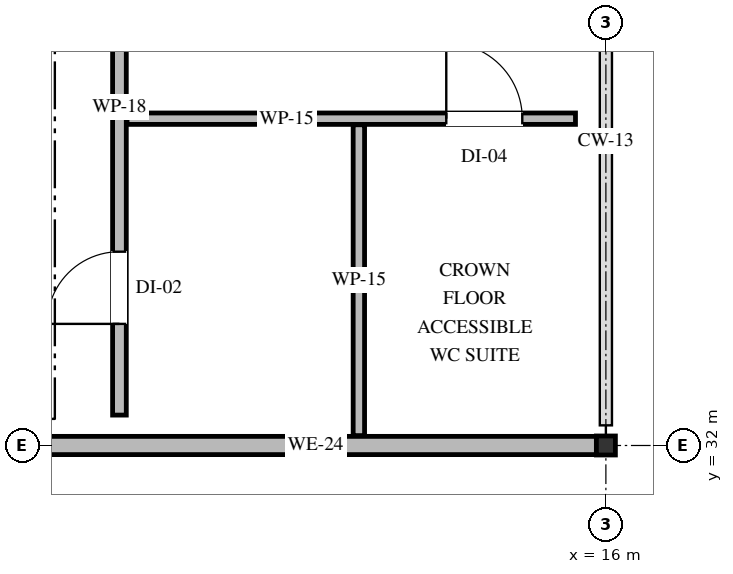
"""IFC4 building model, lengths in metres.
Left out: names, types, materials, properties, quantities, classifications, styles, units other than length and angle.
Written with IfcOpenShell. Run it as: python <this file> out.ifc"""

import sys

from ifc_helpers import new_model, si_unit, direction, frame, frame_2d, origin, origin_2d, place, context, subcontext, project, spatial, rectangle, hollow_rectangle, extrude, element, fill, save


model = new_model("IFC4")
c1 = context("Model", 3, precision=1e-05, world=origin(), true_north=direction((0.0, 1.0)))
c2 = subcontext(c1, "Body", "Model", "MODEL_VIEW")
j1 = project(units=[si_unit("LENGTHUNIT", "METRE"), si_unit("PLANEANGLEUNIT", "RADIAN")], contexts=[c1])
p1 = place(None, origin())
s1 = spatial("IfcSite", under=j1, at=p1, CompositionType="ELEMENT")
p2 = place(p1, origin())
s2 = spatial("IfcBuilding", under=s1, at=p2, CompositionType="ELEMENT")
p3 = place(p2, frame((0.0, 0.0, 19.8)))
s3 = spatial("IfcBuildingStorey", under=s2, at=p3, CompositionType="ELEMENT", Elevation=19.8)
p4 = place(p3, frame((16.0, 32.0, 0.0), z_axis=(0.0, 0.0, 1.0), x_axis=(1.0, 0.0, 0.0)))
e1 = element("IfcColumn", 1, at=p4, inside=s3, PredefinedType="COLUMN", context=c2, shape_type="SweptSolid", body=[
    extrude(hollow_rectangle(XDim=0.25, YDim=0.25, WallThickness=0.012, at=origin_2d()), origin(), (0.0, 0.0, 1.0), 4.5),
])
p5 = place(p3, frame((15.875, 32.0, 0.0), z_axis=(0.0, 0.0, 1.0), x_axis=(-1.0, 0.0, 0.0)))
e2 = element("IfcWall", 2, at=p5, inside=s3, PredefinedType="STANDARD", context=c2, shape_type="SweptSolid", body=[
    extrude(rectangle(XDim=15.75, YDim=0.24, at=frame_2d((7.875, 0.0))), origin(), (0.0, 0.0, 1.0), 4.2),
])
p6 = place(p5, frame((7.385, 0.0, 0.72)))
e3 = element("IfcOpeningElement", 3, at=p6, cuts=e2, PredefinedType="OPENING", context=c2, shape_type="SweptSolid", body=[
    extrude(rectangle(XDim=0.98, YDim=2.15, at=frame_2d((0.49, 1.075))), frame((0.0, 0.13, 0.0), z_axis=(0.0, -1.0, 0.0), x_axis=(1.0, 0.0, 0.0)), (0.0, 0.0, 1.0), 0.26),
])
p7 = place(p5, frame((11.52, 0.0, 0.72)))
e4 = element("IfcOpeningElement", 4, at=p7, cuts=e2, PredefinedType="OPENING", context=c2, shape_type="SweptSolid", body=[
    extrude(rectangle(XDim=0.9, YDim=2.35, at=frame_2d((0.45, 1.175))), frame((0.0, 0.13, 0.0), z_axis=(0.0, -1.0, 0.0), x_axis=(1.0, 0.0, 0.0)), (0.0, 0.0, 1.0), 0.26),
])
p8 = place(p3, frame((9.6, 32.4, 0.0), z_axis=(0.0, 0.0, 1.0), x_axis=(0.0, 1.0, 0.0)))
e5 = element("IfcWall", 5, at=p8, inside=s3, PredefinedType="PARTITIONING", context=c2, shape_type="SweptSolid", body=[
    extrude(rectangle(XDim=23.1, YDim=0.18, at=frame_2d((11.55, 0.0))), origin(), (0.0, 0.0, 1.0), 4.18),
])
p9 = place(p8, frame((1.2, 0.0, 0.0)))
e6 = element("IfcOpeningElement", 6, at=p9, cuts=e5, PredefinedType="OPENING", context=c2, shape_type="SweptSolid", body=[
    extrude(rectangle(XDim=0.95, YDim=2.15, at=frame_2d((0.475, 1.075))), frame((0.0, 0.1, 0.0), z_axis=(0.0, -1.0, 0.0), x_axis=(1.0, 0.0, 0.0)), (0.0, 0.0, 1.0), 0.2),
])
p10 = place(p8, frame((6.2, 0.0, 0.0)))
e7 = element("IfcOpeningElement", 7, at=p10, cuts=e5, PredefinedType="OPENING", context=c2, shape_type="SweptSolid", body=[
    extrude(rectangle(XDim=1.6, YDim=2.3, at=frame_2d((0.8, 1.15))), frame((0.0, 0.1, 0.0), z_axis=(0.0, -1.0, 0.0), x_axis=(1.0, 0.0, 0.0)), (0.0, 0.0, 1.0), 0.2),
])
p11 = place(p8, frame((12.8, 0.0, 0.0)))
e8 = element("IfcOpeningElement", 8, at=p11, cuts=e5, PredefinedType="OPENING", context=c2, shape_type="SweptSolid", body=[
    extrude(rectangle(XDim=1.6, YDim=2.3, at=frame_2d((0.8, 1.15))), frame((0.0, 0.1, 0.0), z_axis=(0.0, -1.0, 0.0), x_axis=(1.0, 0.0, 0.0)), (0.0, 0.0, 1.0), 0.2),
])
p12 = place(p8, frame((19.2, 0.0, 0.0)))
e9 = element("IfcOpeningElement", 9, at=p12, cuts=e5, PredefinedType="OPENING", context=c2, shape_type="SweptSolid", body=[
    extrude(rectangle(XDim=1.0, YDim=2.2, at=frame_2d((0.5, 1.1))), frame((0.0, 0.1, 0.0), z_axis=(0.0, -1.0, 0.0), x_axis=(1.0, 0.0, 0.0)), (0.0, 0.0, 1.0), 0.2),
])
p13 = place(p3, frame((9.7, 36.3, 0.0), z_axis=(0.0, 0.0, 1.0), x_axis=(1.0, 0.0, 0.0)))
e10 = element("IfcWall", 10, at=p13, inside=s3, PredefinedType="PARTITIONING", context=c2, shape_type="SweptSolid", body=[
    extrude(rectangle(XDim=5.9, YDim=0.15, at=frame_2d((2.95, 0.0))), origin(), (0.0, 0.0, 1.0), 4.18),
])
p14 = place(p13, frame((4.2, 0.0, 0.0)))
e11 = element("IfcOpeningElement", 11, at=p14, cuts=e10, PredefinedType="OPENING", context=c2, shape_type="SweptSolid", body=[
    extrude(rectangle(XDim=1.0, YDim=2.1, at=frame_2d((0.5, 1.05))), frame((0.0, 0.085, 0.0), z_axis=(0.0, -1.0, 0.0), x_axis=(1.0, 0.0, 0.0)), (0.0, 0.0, 1.0), 0.17),
])
p15 = place(p3, frame((12.75, 32.13, 0.0), z_axis=(0.0, 0.0, 1.0), x_axis=(0.0, 1.0, 0.0)))
e12 = element("IfcWall", 12, at=p15, inside=s3, PredefinedType="PARTITIONING", context=c2, shape_type="SweptSolid", body=[
    extrude(rectangle(XDim=4.09, YDim=0.15, at=frame_2d((2.045, 0.0))), origin(), (0.0, 0.0, 1.0), 4.18),
])
p16 = place(p9, origin())
e13 = element("IfcDoor", 13, at=p16, inside=s3, OperationType="SINGLE_SWING_LEFT", PredefinedType="DOOR", context=c2, shape_type="SweptSolid", body=[
    extrude(rectangle(XDim=0.95, YDim=2.15, at=frame_2d((0.475, 1.075))), frame((0.0, 0.025, 0.0), z_axis=(0.0, -1.0, 0.0), x_axis=(1.0, 0.0, 0.0)), (0.0, 0.0, 1.0), 0.05),
])
fill(e6, e13)
p17 = place(p14, origin())
e14 = element("IfcDoor", 14, at=p17, inside=s3, OperationType="SINGLE_SWING_LEFT", PredefinedType="DOOR", context=c2, shape_type="SweptSolid", body=[
    extrude(rectangle(XDim=1.0, YDim=2.1, at=frame_2d((0.5, 1.05))), frame((0.0, 0.025, 0.0), z_axis=(0.0, -1.0, 0.0), x_axis=(1.0, 0.0, 0.0)), (0.0, 0.0, 1.0), 0.05),
])
fill(e11, e14)
save(model, sys.argv[1])
